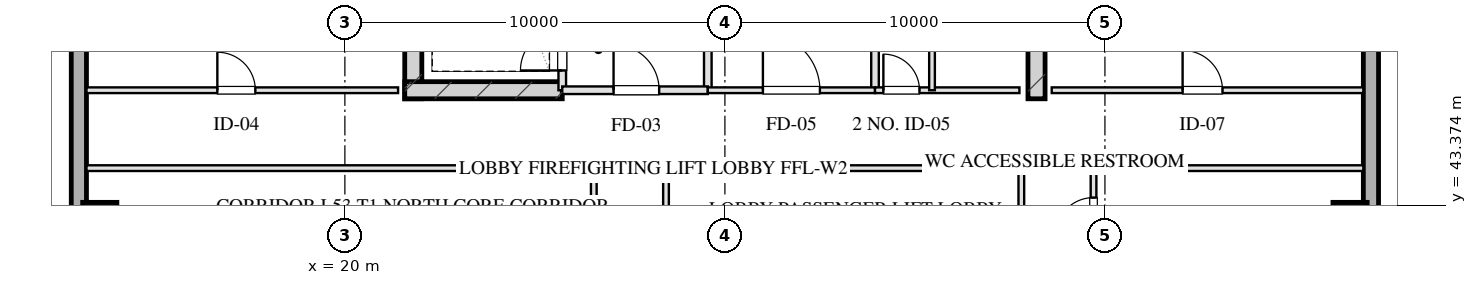
"""IFC4 building model, lengths in metres.
Left out: names, types, materials, properties, quantities, classifications, styles, units other than length and angle.
Written with IfcOpenShell. Run it as: python <this file> out.ifc"""

import sys

from ifc_helpers import new_model, si_unit, direction, frame, frame_2d, origin, origin_2d, place, context, subcontext, project, spatial, rectangle, hollow_rectangle, extrude, element, fill, save


model = new_model("IFC4")
c1 = context("Model", 3, precision=1e-05, world=origin(), true_north=direction((0.0, 1.0)))
c2 = subcontext(c1, "Body", "Model", "MODEL_VIEW")
j1 = project(units=[si_unit("LENGTHUNIT", "METRE"), si_unit("PLANEANGLEUNIT", "RADIAN")], contexts=[c1])
p1 = place(None, origin())
s1 = spatial("IfcSite", under=j1, at=p1, CompositionType="ELEMENT")
p2 = place(p1, origin())
s2 = spatial("IfcBuilding", under=s1, at=p2, CompositionType="ELEMENT")
p3 = place(p2, frame((0.0, 0.0, 198.95)))
s3 = spatial("IfcBuildingStorey", under=s2, at=p3, CompositionType="ELEMENT", Elevation=198.95)
for number, where, z_axis, x_axis in (
    (1, (21.8, 46.175, 0.0), (0.0, 0.0, 1.0), (0.0, 1.0, 0.0)),
    (2, (38.2, 46.175, 0.0), (0.0, 0.0, 1.0), (0.0, 1.0, 0.0)),
):
    element("IfcWall", number, at=place(p3, frame(where, z_axis=z_axis, x_axis=x_axis)), inside=s3, PredefinedType="SHEAR", context=c2, shape_type="SweptSolid", body=[
        extrude(rectangle(XDim=9.33, YDim=0.45, at=frame_2d((4.665, 0.0))), origin(), (0.0, 0.0, 1.0), 3.45),
    ])
p4 = place(p3, frame((21.575, 46.4, 0.0), z_axis=(0.0, 0.0, 1.0), x_axis=(1.0, 0.0, 0.0)))
e3 = element("IfcWall", 3, at=p4, inside=s3, PredefinedType="SHEAR", context=c2, shape_type="SweptSolid", body=[
    extrude(rectangle(XDim=4.145, YDim=0.45, at=frame_2d((2.073, 0.0))), origin(), (0.0, 0.0, 1.0), 3.45),
])
for number, where, z_axis, x_axis in (
    (4, (13.55, 43.0, 0.0), (0.0, 0.0, 1.0), (1.0, 0.0, 0.0)),
    (5, (46.45, 43.0, 0.0), (0.0, 0.0, 1.0), (1.0, 0.0, 0.0)),
):
    element("IfcColumn", number, at=place(p3, frame(where, z_axis=z_axis, x_axis=x_axis)), inside=s3, PredefinedType="COLUMN", context=c2, shape_type="SweptSolid", body=[
        extrude(hollow_rectangle(XDim=0.9, YDim=0.9, WallThickness=0.032, at=origin_2d()), origin(), (0.0, 0.0, 1.0), 3.451),
    ])
p5 = place(p3, frame((13.0, 10.8, 0.0), z_axis=(0.0, 0.0, 1.0), x_axis=(0.0, 1.0, 0.0)))
e6 = element("IfcWall", 6, at=p5, inside=s3, PredefinedType="SOLIDWALL", context=c2, shape_type="SweptSolid", body=[
    extrude(rectangle(XDim=46.4, YDim=0.4, at=frame_2d((23.2, 0.0))), origin(), (0.0, 0.0, 1.0), 2.61),
])
p6 = place(p5, frame((15.75, 0.0, 0.75)))
e7 = element("IfcOpeningElement", 7, at=p6, cuts=e6, PredefinedType="OPENING", context=c2, shape_type="SweptSolid", body=[
    extrude(rectangle(XDim=2.1, YDim=1.46, at=frame_2d((1.05, 0.73))), frame((0.0, 0.21, 0.0), z_axis=(0.0, -1.0, 0.0), x_axis=(1.0, 0.0, 0.0)), (0.0, 0.0, 1.0), 0.42),
])
p7 = place(p5, frame((19.55, 0.0, 0.75)))
e8 = element("IfcOpeningElement", 8, at=p7, cuts=e6, PredefinedType="OPENING", context=c2, shape_type="SweptSolid", body=[
    extrude(rectangle(XDim=2.1, YDim=1.46, at=frame_2d((1.05, 0.73))), frame((0.0, 0.21, 0.0), z_axis=(0.0, -1.0, 0.0), x_axis=(1.0, 0.0, 0.0)), (0.0, 0.0, 1.0), 0.42),
])
p8 = place(p5, frame((27.05, 0.0, 0.0)))
e9 = element("IfcOpeningElement", 9, at=p8, cuts=e6, PredefinedType="OPENING", context=c2, shape_type="SweptSolid", body=[
    extrude(rectangle(XDim=1.1, YDim=2.15, at=frame_2d((0.55, 1.075))), frame((0.0, 0.21, 0.0), z_axis=(0.0, -1.0, 0.0), x_axis=(1.0, 0.0, 0.0)), (0.0, 0.0, 1.0), 0.42),
])
p9 = place(p3, frame((47.0, 57.2, 0.0), z_axis=(0.0, 0.0, 1.0), x_axis=(0.0, -1.0, 0.0)))
e10 = element("IfcWall", 10, at=p9, inside=s3, PredefinedType="SOLIDWALL", context=c2, shape_type="SweptSolid", body=[
    extrude(rectangle(XDim=46.4, YDim=0.4, at=frame_2d((23.2, 0.0))), origin(), (0.0, 0.0, 1.0), 2.61),
])
p10 = place(p9, frame((28.55, 0.0, 0.75)))
e11 = element("IfcOpeningElement", 11, at=p10, cuts=e10, PredefinedType="OPENING", context=c2, shape_type="SweptSolid", body=[
    extrude(rectangle(XDim=2.1, YDim=1.46, at=frame_2d((1.05, 0.73))), frame((0.0, 0.21, 0.0), z_axis=(0.0, -1.0, 0.0), x_axis=(1.0, 0.0, 0.0)), (0.0, 0.0, 1.0), 0.42),
])
p11 = place(p9, frame((24.75, 0.0, 0.75)))
e12 = element("IfcOpeningElement", 12, at=p11, cuts=e10, PredefinedType="OPENING", context=c2, shape_type="SweptSolid", body=[
    extrude(rectangle(XDim=2.1, YDim=1.46, at=frame_2d((1.05, 0.73))), frame((0.0, 0.21, 0.0), z_axis=(0.0, -1.0, 0.0), x_axis=(1.0, 0.0, 0.0)), (0.0, 0.0, 1.0), 0.42),
])
p12 = place(p9, frame((16.667, 0.0, 0.0)))
e13 = element("IfcOpeningElement", 13, at=p12, cuts=e10, PredefinedType="OPENING", context=c2, shape_type="SweptSolid", body=[
    extrude(rectangle(XDim=1.1, YDim=2.15, at=frame_2d((0.55, 1.075))), frame((0.0, 0.21, 0.0), z_axis=(0.0, -1.0, 0.0), x_axis=(1.0, 0.0, 0.0)), (0.0, 0.0, 1.0), 0.42),
])
p13 = place(p3, frame((25.72, 46.4, 0.0), z_axis=(0.0, 0.0, 1.0), x_axis=(0.0, 1.0, 0.0)))
e14 = element("IfcWall", 14, at=p13, inside=s3, PredefinedType="PARTITIONING", context=c2, shape_type="SweptSolid", body=[
    extrude(rectangle(XDim=1.9, YDim=0.2, at=frame_2d((0.95, 0.0))), origin(), (0.0, 0.0, 1.0), 3.175),
])
p14 = place(p13, frame((0.52, 0.0, 0.0)))
e15 = element("IfcOpeningElement", 15, at=p14, cuts=e14, PredefinedType="OPENING", context=c2, shape_type="SweptSolid", body=[
    extrude(rectangle(XDim=1.1, YDim=2.05, at=frame_2d((0.55, 1.025))), frame((0.0, 0.11, 0.0), z_axis=(0.0, -1.0, 0.0), x_axis=(1.0, 0.0, 0.0)), (0.0, 0.0, 1.0), 0.22),
])
p15 = place(p3, frame((29.55, 46.4, 0.0), z_axis=(0.0, 0.0, 1.0), x_axis=(0.0, 1.0, 0.0)))
e16 = element("IfcWall", 16, at=p15, inside=s3, PredefinedType="PARTITIONING", context=c2, shape_type="SweptSolid", body=[
    extrude(rectangle(XDim=8.43, YDim=0.2, at=frame_2d((4.215, 0.0))), origin(), (0.0, 0.0, 1.0), 3.175),
])
p16 = place(p3, frame((25.72, 46.4, 0.0), z_axis=(0.0, 0.0, 1.0), x_axis=(1.0, 0.0, 0.0)))
e17 = element("IfcWall", 17, at=p16, inside=s3, PredefinedType="PARTITIONING", context=c2, shape_type="SweptSolid", body=[
    extrude(rectangle(XDim=3.83, YDim=0.2, at=frame_2d((1.915, 0.0))), origin(), (0.0, 0.0, 1.0), 3.175),
])
p17 = place(p16, frame((1.35, 0.0, 0.0)))
e18 = element("IfcOpeningElement", 18, at=p17, cuts=e17, PredefinedType="OPENING", context=c2, shape_type="SweptSolid", body=[
    extrude(rectangle(XDim=1.2, YDim=2.05, at=frame_2d((0.6, 1.025))), frame((0.0, 0.11, 0.0), z_axis=(0.0, -1.0, 0.0), x_axis=(1.0, 0.0, 0.0)), (0.0, 0.0, 1.0), 0.22),
])
p18 = place(p3, frame((33.95, 46.4, 0.0), z_axis=(0.0, 0.0, 1.0), x_axis=(0.0, 1.0, 0.0)))
e19 = element("IfcWall", 19, at=p18, inside=s3, PredefinedType="PARTITIONING", context=c2, shape_type="SweptSolid", body=[
    extrude(rectangle(XDim=8.43, YDim=0.2, at=frame_2d((4.215, 0.0))), origin(), (0.0, 0.0, 1.0), 3.175),
])
p19 = place(p3, frame((29.55, 46.4, 0.0), z_axis=(0.0, 0.0, 1.0), x_axis=(1.0, 0.0, 0.0)))
e20 = element("IfcWall", 20, at=p19, inside=s3, PredefinedType="PARTITIONING", context=c2, shape_type="SweptSolid", body=[
    extrude(rectangle(XDim=4.4, YDim=0.15, at=frame_2d((2.2, 0.0))), origin(), (0.0, 0.0, 1.0), 3.175),
])
p20 = place(p19, frame((1.45, 0.0, 0.0)))
e21 = element("IfcOpeningElement", 21, at=p20, cuts=e20, PredefinedType="OPENING", context=c2, shape_type="SweptSolid", body=[
    extrude(rectangle(XDim=1.5, YDim=2.05, at=frame_2d((0.75, 1.025))), frame((0.0, 0.085, 0.0), z_axis=(0.0, -1.0, 0.0), x_axis=(1.0, 0.0, 0.0)), (0.0, 0.0, 1.0), 0.17),
])
p21 = place(p3, frame((33.95, 46.4, 0.0), z_axis=(0.0, 0.0, 1.0), x_axis=(1.0, 0.0, 0.0)))
e22 = element("IfcWall", 22, at=p21, inside=s3, PredefinedType="PARTITIONING", context=c2, shape_type="SweptSolid", body=[
    extrude(rectangle(XDim=3.8, YDim=0.15, at=frame_2d((1.9, 0.0))), origin(), (0.0, 0.0, 1.0), 3.175),
])
p22 = place(p21, frame((0.22, 0.0, 0.0)))
e23 = element("IfcOpeningElement", 23, at=p22, cuts=e22, PredefinedType="OPENING", context=c2, shape_type="SweptSolid", body=[
    extrude(rectangle(XDim=0.95, YDim=2.05, at=frame_2d((0.475, 1.025))), frame((0.0, 0.085, 0.0), z_axis=(0.0, -1.0, 0.0), x_axis=(1.0, 0.0, 0.0)), (0.0, 0.0, 1.0), 0.17),
])
p23 = place(p3, frame((35.45, 46.4, 0.0), z_axis=(0.0, 0.0, 1.0), x_axis=(0.0, 1.0, 0.0)))
e24 = element("IfcWall", 24, at=p23, inside=s3, PredefinedType="PARTITIONING", context=c2, shape_type="SweptSolid", body=[
    extrude(rectangle(XDim=8.43, YDim=0.15, at=frame_2d((4.215, 0.0))), origin(), (0.0, 0.0, 1.0), 2.815),
])
p24 = place(p23, frame((2.55, 0.0, 0.0)))
e25 = element("IfcOpeningElement", 25, at=p24, cuts=e24, PredefinedType="OPENING", context=c2, shape_type="SweptSolid", body=[
    extrude(rectangle(XDim=0.95, YDim=2.05, at=frame_2d((0.475, 1.025))), frame((0.0, 0.085, 0.0), z_axis=(0.0, -1.0, 0.0), x_axis=(1.0, 0.0, 0.0)), (0.0, 0.0, 1.0), 0.17),
])
p25 = place(p23, frame((5.8, 0.0, 0.0)))
e26 = element("IfcOpeningElement", 26, at=p25, cuts=e24, PredefinedType="OPENING", context=c2, shape_type="SweptSolid", body=[
    extrude(rectangle(XDim=0.9, YDim=2.05, at=frame_2d((0.45, 1.025))), frame((0.0, 0.085, 0.0), z_axis=(0.0, -1.0, 0.0), x_axis=(1.0, 0.0, 0.0)), (0.0, 0.0, 1.0), 0.17),
])
p26 = place(p3, frame((13.2, 46.4, 0.0), z_axis=(0.0, 0.0, 1.0), x_axis=(1.0, 0.0, 0.0)))
e27 = element("IfcWall", 27, at=p26, inside=s3, PredefinedType="PARTITIONING", context=c2, shape_type="SweptSolid", body=[
    extrude(rectangle(XDim=8.2, YDim=0.15, at=frame_2d((4.1, 0.0))), origin(), (0.0, 0.0, 1.0), 3.175),
])
p27 = place(p26, frame((3.444, 0.0, 0.0)))
e28 = element("IfcOpeningElement", 28, at=p27, cuts=e27, PredefinedType="OPENING", context=c2, shape_type="SweptSolid", body=[
    extrude(rectangle(XDim=1.0, YDim=2.05, at=frame_2d((0.5, 1.025))), frame((0.0, 0.085, 0.0), z_axis=(0.0, -1.0, 0.0), x_axis=(1.0, 0.0, 0.0)), (0.0, 0.0, 1.0), 0.17),
])
p28 = place(p3, frame((38.6, 46.4, 0.0), z_axis=(0.0, 0.0, 1.0), x_axis=(1.0, 0.0, 0.0)))
e29 = element("IfcWall", 29, at=p28, inside=s3, PredefinedType="PARTITIONING", context=c2, shape_type="SweptSolid", body=[
    extrude(rectangle(XDim=8.2, YDim=0.15, at=frame_2d((4.1, 0.0))), origin(), (0.0, 0.0, 1.0), 3.175),
])
p29 = place(p28, frame((3.444, 0.0, 0.0)))
e30 = element("IfcOpeningElement", 30, at=p29, cuts=e29, PredefinedType="OPENING", context=c2, shape_type="SweptSolid", body=[
    extrude(rectangle(XDim=1.05, YDim=2.05, at=frame_2d((0.525, 1.025))), frame((0.0, 0.085, 0.0), z_axis=(0.0, -1.0, 0.0), x_axis=(1.0, 0.0, 0.0)), (0.0, 0.0, 1.0), 0.17),
])
p30 = place(p3, frame((13.2, 44.35, 0.0), z_axis=(0.0, 0.0, 1.0), x_axis=(1.0, 0.0, 0.0)))
e31 = element("IfcWall", 31, at=p30, inside=s3, PredefinedType="PARTITIONING", context=c2, shape_type="SweptSolid", body=[
    extrude(rectangle(XDim=13.35, YDim=0.15, at=frame_2d((6.675, 0.0))), origin(), (0.0, 0.0, 1.0), 3.175),
])
p31 = place(p3, frame((28.45, 44.35, 0.0), z_axis=(0.0, 0.0, 1.0), x_axis=(1.0, 0.0, 0.0)))
e32 = element("IfcWall", 32, at=p31, inside=s3, PredefinedType="PARTITIONING", context=c2, shape_type="SweptSolid", body=[
    extrude(rectangle(XDim=9.35, YDim=0.15, at=frame_2d((4.675, 0.0))), origin(), (0.0, 0.0, 1.0), 3.175),
])
p32 = place(p3, frame((39.7, 44.35, 0.0), z_axis=(0.0, 0.0, 1.0), x_axis=(1.0, 0.0, 0.0)))
e33 = element("IfcWall", 33, at=p32, inside=s3, PredefinedType="PARTITIONING", context=c2, shape_type="SweptSolid", body=[
    extrude(rectangle(XDim=7.1, YDim=0.15, at=frame_2d((3.55, 0.0))), origin(), (0.0, 0.0, 1.0), 3.175),
])
p33 = place(p3, frame((26.55, 23.65, 0.0), z_axis=(0.0, 0.0, 1.0), x_axis=(0.0, 1.0, 0.0)))
e34 = element("IfcWall", 34, at=p33, inside=s3, PredefinedType="PARTITIONING", context=c2, shape_type="SweptSolid", body=[
    extrude(rectangle(XDim=20.7, YDim=0.15, at=frame_2d((10.35, 0.0))), origin(), (0.0, 0.0, 1.0), 3.175),
])
p34 = place(p33, frame((4.075, 0.0, 0.0)))
e35 = element("IfcOpeningElement", 35, at=p34, cuts=e34, PredefinedType="OPENING", context=c2, shape_type="SweptSolid", body=[
    extrude(rectangle(XDim=1.0, YDim=2.05, at=frame_2d((0.5, 1.025))), frame((0.0, 0.085, 0.0), z_axis=(0.0, -1.0, 0.0), x_axis=(1.0, 0.0, 0.0)), (0.0, 0.0, 1.0), 0.17),
])
p35 = place(p33, frame((14.425, 0.0, 0.0)))
e36 = element("IfcOpeningElement", 36, at=p35, cuts=e34, PredefinedType="OPENING", context=c2, shape_type="SweptSolid", body=[
    extrude(rectangle(XDim=1.0, YDim=2.05, at=frame_2d((0.5, 1.025))), frame((0.0, 0.085, 0.0), z_axis=(0.0, -1.0, 0.0), x_axis=(1.0, 0.0, 0.0)), (0.0, 0.0, 1.0), 0.17),
])
p36 = place(p3, frame((28.45, 23.65, 0.0), z_axis=(0.0, 0.0, 1.0), x_axis=(0.0, 1.0, 0.0)))
e37 = element("IfcWall", 37, at=p36, inside=s3, PredefinedType="PARTITIONING", context=c2, shape_type="SweptSolid", body=[
    extrude(rectangle(XDim=20.7, YDim=0.15, at=frame_2d((10.35, 0.0))), origin(), (0.0, 0.0, 1.0), 3.175),
])
p37 = place(p36, frame((9.936, 0.0, 0.0)))
e38 = element("IfcOpeningElement", 38, at=p37, cuts=e37, PredefinedType="OPENING", context=c2, shape_type="SweptSolid", body=[
    extrude(rectangle(XDim=1.1, YDim=2.05, at=frame_2d((0.55, 1.025))), frame((0.0, 0.085, 0.0), z_axis=(0.0, -1.0, 0.0), x_axis=(1.0, 0.0, 0.0)), (0.0, 0.0, 1.0), 0.17),
])
p38 = place(p3, frame((37.8, 23.65, 0.0), z_axis=(0.0, 0.0, 1.0), x_axis=(0.0, 1.0, 0.0)))
e39 = element("IfcWall", 39, at=p38, inside=s3, PredefinedType="PARTITIONING", context=c2, shape_type="SweptSolid", body=[
    extrude(rectangle(XDim=20.7, YDim=0.15, at=frame_2d((10.35, 0.0))), origin(), (0.0, 0.0, 1.0), 3.175),
])
p39 = place(p3, frame((39.7, 23.65, 0.0), z_axis=(0.0, 0.0, 1.0), x_axis=(0.0, 1.0, 0.0)))
e40 = element("IfcWall", 40, at=p39, inside=s3, PredefinedType="PARTITIONING", context=c2, shape_type="SweptSolid", body=[
    extrude(rectangle(XDim=20.7, YDim=0.15, at=frame_2d((10.35, 0.0))), origin(), (0.0, 0.0, 1.0), 3.175),
])
p40 = place(p39, frame((0.775, 0.0, 0.0)))
e41 = element("IfcOpeningElement", 41, at=p40, cuts=e40, PredefinedType="OPENING", context=c2, shape_type="SweptSolid", body=[
    extrude(rectangle(XDim=1.0, YDim=2.05, at=frame_2d((0.5, 1.025))), frame((0.0, 0.085, 0.0), z_axis=(0.0, -1.0, 0.0), x_axis=(1.0, 0.0, 0.0)), (0.0, 0.0, 1.0), 0.17),
])
p41 = place(p39, frame((3.95, 0.0, 0.0)))
e42 = element("IfcOpeningElement", 42, at=p41, cuts=e40, PredefinedType="OPENING", context=c2, shape_type="SweptSolid", body=[
    extrude(rectangle(XDim=1.0, YDim=2.05, at=frame_2d((0.5, 1.025))), frame((0.0, 0.085, 0.0), z_axis=(0.0, -1.0, 0.0), x_axis=(1.0, 0.0, 0.0)), (0.0, 0.0, 1.0), 0.17),
])
p42 = place(p39, frame((8.19, 0.0, 0.0)))
e43 = element("IfcOpeningElement", 43, at=p42, cuts=e40, PredefinedType="OPENING", context=c2, shape_type="SweptSolid", body=[
    extrude(rectangle(XDim=0.85, YDim=2.05, at=frame_2d((0.425, 1.025))), frame((0.0, 0.085, 0.0), z_axis=(0.0, -1.0, 0.0), x_axis=(1.0, 0.0, 0.0)), (0.0, 0.0, 1.0), 0.17),
])
p43 = place(p39, frame((12.373, 0.0, 0.0)))
e44 = element("IfcOpeningElement", 44, at=p43, cuts=e40, PredefinedType="OPENING", context=c2, shape_type="SweptSolid", body=[
    extrude(rectangle(XDim=1.05, YDim=2.05, at=frame_2d((0.525, 1.025))), frame((0.0, 0.085, 0.0), z_axis=(0.0, -1.0, 0.0), x_axis=(1.0, 0.0, 0.0)), (0.0, 0.0, 1.0), 0.17),
])
p44 = place(p39, frame((15.933, 0.0, 0.0)))
e45 = element("IfcOpeningElement", 45, at=p44, cuts=e40, PredefinedType="OPENING", context=c2, shape_type="SweptSolid", body=[
    extrude(rectangle(XDim=1.0, YDim=2.05, at=frame_2d((0.5, 1.025))), frame((0.0, 0.085, 0.0), z_axis=(0.0, -1.0, 0.0), x_axis=(1.0, 0.0, 0.0)), (0.0, 0.0, 1.0), 0.17),
])
p45 = place(p39, frame((18.925, 0.0, 0.0)))
e46 = element("IfcOpeningElement", 46, at=p45, cuts=e40, PredefinedType="OPENING", context=c2, shape_type="SweptSolid", body=[
    extrude(rectangle(XDim=1.0, YDim=2.05, at=frame_2d((0.5, 1.025))), frame((0.0, 0.085, 0.0), z_axis=(0.0, -1.0, 0.0), x_axis=(1.0, 0.0, 0.0)), (0.0, 0.0, 1.0), 0.17),
])
p46 = place(p14, origin())
e47 = element("IfcDoor", 47, at=p46, inside=s3, OperationType="SINGLE_SWING_LEFT", PredefinedType="DOOR", context=c2, shape_type="SweptSolid", body=[
    extrude(rectangle(XDim=1.1, YDim=2.05, at=frame_2d((0.55, 1.025))), frame((0.0, 0.025, 0.0), z_axis=(0.0, -1.0, 0.0), x_axis=(1.0, 0.0, 0.0)), (0.0, 0.0, 1.0), 0.05),
])
fill(e15, e47)
p47 = place(p17, origin())
e48 = element("IfcDoor", 48, at=p47, inside=s3, OperationType="SINGLE_SWING_LEFT", PredefinedType="DOOR", context=c2, shape_type="SweptSolid", body=[
    extrude(rectangle(XDim=1.2, YDim=2.05, at=frame_2d((0.6, 1.025))), frame((0.0, 0.025, 0.0), z_axis=(0.0, -1.0, 0.0), x_axis=(1.0, 0.0, 0.0)), (0.0, 0.0, 1.0), 0.05),
])
fill(e18, e48)
p48 = place(p20, origin())
e49 = element("IfcDoor", 49, at=p48, inside=s3, OperationType="SINGLE_SWING_LEFT", PredefinedType="DOOR", context=c2, shape_type="SweptSolid", body=[
    extrude(rectangle(XDim=1.5, YDim=2.05, at=frame_2d((0.75, 1.025))), frame((0.0, 0.025, 0.0), z_axis=(0.0, -1.0, 0.0), x_axis=(1.0, 0.0, 0.0)), (0.0, 0.0, 1.0), 0.05),
])
fill(e21, e49)
p49 = place(p22, origin())
e50 = element("IfcDoor", 50, at=p49, inside=s3, OperationType="SINGLE_SWING_LEFT", PredefinedType="DOOR", context=c2, shape_type="SweptSolid", body=[
    extrude(rectangle(XDim=0.95, YDim=2.05, at=frame_2d((0.475, 1.025))), frame((0.0, 0.025, 0.0), z_axis=(0.0, -1.0, 0.0), x_axis=(1.0, 0.0, 0.0)), (0.0, 0.0, 1.0), 0.05),
])
fill(e23, e50)
p50 = place(p27, origin())
e51 = element("IfcDoor", 51, at=p50, inside=s3, OperationType="SINGLE_SWING_LEFT", PredefinedType="DOOR", context=c2, shape_type="SweptSolid", body=[
    extrude(rectangle(XDim=1.0, YDim=2.05, at=frame_2d((0.5, 1.025))), frame((0.0, 0.025, 0.0), z_axis=(0.0, -1.0, 0.0), x_axis=(1.0, 0.0, 0.0)), (0.0, 0.0, 1.0), 0.05),
])
fill(e28, e51)
p51 = place(p29, origin())
e52 = element("IfcDoor", 52, at=p51, inside=s3, OperationType="SINGLE_SWING_LEFT", PredefinedType="DOOR", context=c2, shape_type="SweptSolid", body=[
    extrude(rectangle(XDim=1.05, YDim=2.05, at=frame_2d((0.525, 1.025))), frame((0.0, 0.025, 0.0), z_axis=(0.0, -1.0, 0.0), x_axis=(1.0, 0.0, 0.0)), (0.0, 0.0, 1.0), 0.05),
])
fill(e30, e52)
p52 = place(p45, origin())
e53 = element("IfcDoor", 53, at=p52, inside=s3, OperationType="SINGLE_SWING_LEFT", PredefinedType="DOOR", context=c2, shape_type="SweptSolid", body=[
    extrude(rectangle(XDim=1.0, YDim=2.05, at=frame_2d((0.5, 1.025))), frame((0.0, 0.025, 0.0), z_axis=(0.0, -1.0, 0.0), x_axis=(1.0, 0.0, 0.0)), (0.0, 0.0, 1.0), 0.05),
])
fill(e46, e53)
save(model, sys.argv[1])
